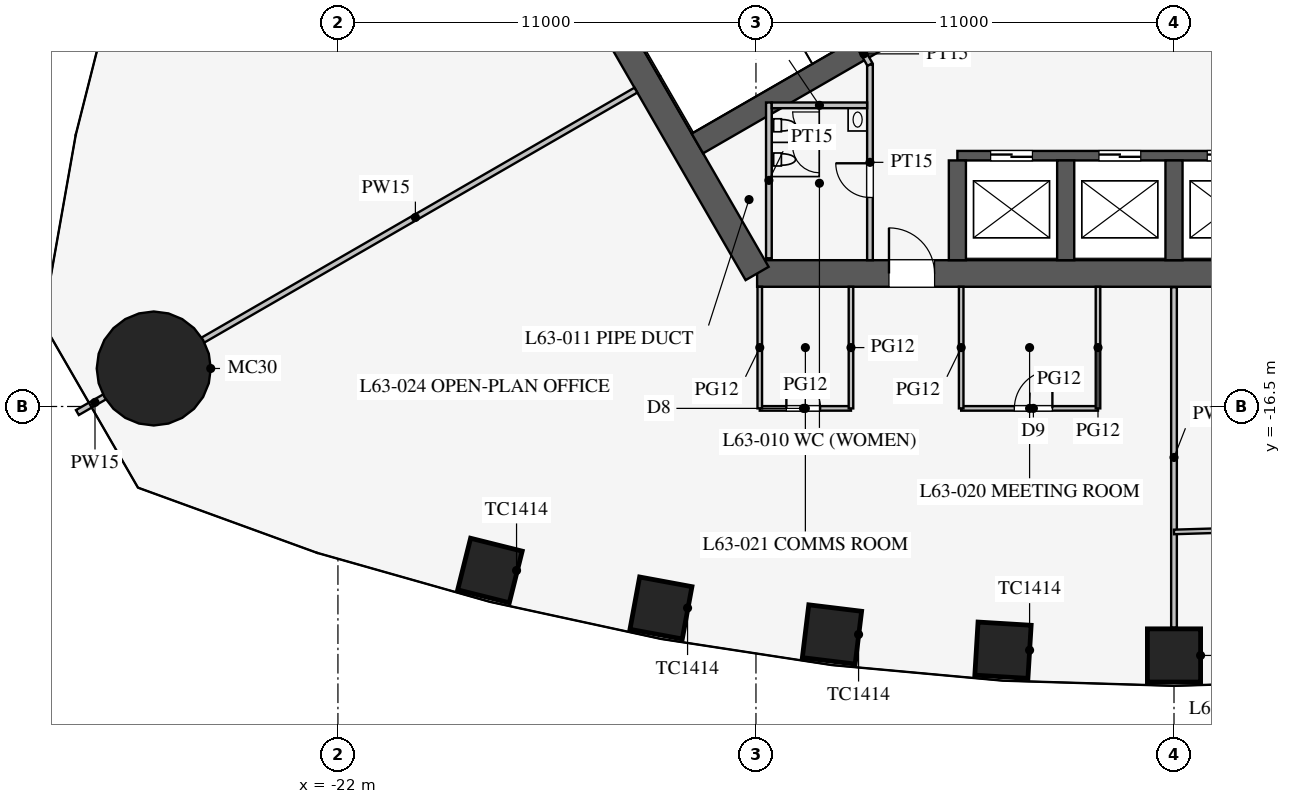
"""IFC4 building model, lengths in metres.
Left out: names, types, materials, properties, quantities, classifications, styles, units other than length and angle.
Written with IfcOpenShell. Run it as: python <this file> out.ifc"""

import sys

from ifc_helpers import new_model, si_unit, direction, frame, frame_2d, origin, origin_2d, place, context, subcontext, project, spatial, rectangle, circle, extrude, element, fill, save


model = new_model("IFC4")
c1 = context("Model", 3, precision=1e-05, world=origin(), true_north=direction((0.0, 1.0)))
c2 = subcontext(c1, "Body", "Model", "MODEL_VIEW")
j1 = project(units=[si_unit("LENGTHUNIT", "METRE"), si_unit("PLANEANGLEUNIT", "RADIAN")], contexts=[c1])
p1 = place(None, origin())
s1 = spatial("IfcSite", under=j1, at=p1, CompositionType="ELEMENT")
p2 = place(p1, origin())
s2 = spatial("IfcBuilding", under=s1, at=p2, CompositionType="ELEMENT")
p3 = place(p2, frame((0.0, 0.0, 276.3)))
s3 = spatial("IfcBuildingStorey", under=s2, at=p3, CompositionType="ELEMENT", Elevation=276.3)
for number, where, z_axis, x_axis in (
    (1, (-18.0, -20.816, 0.0), (0.0, 0.0, 1.0), (0.97, -0.242, 0.0)),
    (2, (-13.5, -21.803, 0.0), (0.0, 0.0, 1.0), (0.983, -0.182, 0.0)),
    (3, (-9.0, -22.499, 0.0), (0.0, 0.0, 1.0), (0.993, -0.121, 0.0)),
    (4, (-4.5, -22.914, 0.0), (0.0, 0.0, 1.0), (0.998, -0.061, 0.0)),
    (5, (0.0, -23.052, 0.0), (0.0, 0.0, 1.0), (1.0, 0.0, 0.0)),
):
    element("IfcColumn", number, at=place(p3, frame(where, z_axis=z_axis, x_axis=x_axis)), inside=s3, PredefinedType="COLUMN", context=c2, shape_type="SweptSolid", body=[
        extrude(rectangle(XDim=1.4, YDim=1.4, at=origin_2d()), origin(), (0.0, 0.0, 1.0), 4.2),
    ])
p4 = place(p3, frame((-26.847, -15.5, 0.0), z_axis=(0.0, 0.0, 1.0), x_axis=(1.0, 0.0, 0.0)))
e6 = element("IfcColumn", 6, at=p4, inside=s3, PredefinedType="COLUMN", context=c2, shape_type="SweptSolid", body=[
    extrude(circle(Radius=1.5, at=origin_2d()), origin(), (0.0, 0.0, 1.0), 4.2),
])
p5 = place(p3, frame((-10.97, -13.0, 0.0), z_axis=(0.0, 0.0, 1.0), x_axis=(1.0, 0.0, 0.0)))
e7 = element("IfcWall", 7, at=p5, inside=s3, PredefinedType="SHEAR", context=c2, shape_type="SweptSolid", body=[
    extrude(rectangle(XDim=21.939, YDim=0.7, at=frame_2d((10.97, 0.0))), origin(), (0.0, 0.0, 1.0), 4.2),
])
p6 = place(p5, frame((17.27, 0.0, 0.0)))
e8 = element("IfcOpeningElement", 8, at=p6, cuts=e7, PredefinedType="OPENING", context=c2, shape_type="SweptSolid", body=[
    extrude(rectangle(XDim=1.2, YDim=2.1, at=frame_2d((0.6, 1.05))), frame((0.0, 0.36, 0.0), z_axis=(0.0, -1.0, 0.0), x_axis=(1.0, 0.0, 0.0)), (0.0, 0.0, 1.0), 0.72),
])
p7 = place(p5, frame((3.47, 0.0, 0.0)))
e9 = element("IfcOpeningElement", 9, at=p7, cuts=e7, PredefinedType="OPENING", context=c2, shape_type="SweptSolid", body=[
    extrude(rectangle(XDim=1.2, YDim=2.1, at=frame_2d((0.6, 1.05))), frame((0.0, 0.36, 0.0), z_axis=(0.0, -1.0, 0.0), x_axis=(1.0, 0.0, 0.0)), (0.0, 0.0, 1.0), 0.72),
])
p8 = place(p3, frame((-16.743, -3.0, 0.0), z_axis=(0.0, 0.0, 1.0), x_axis=(0.499995765644, -0.866027848477, 0.0)))
e10 = element("IfcWall", 10, at=p8, inside=s3, PredefinedType="SHEAR", context=c2, shape_type="SweptSolid", body=[
    extrude(rectangle(XDim=11.547, YDim=0.7, at=frame_2d((5.773, 0.0))), origin(), (0.0, 0.0, 1.0), 4.2),
])
p9 = place(p3, frame((-5.7, -9.9, 0.0), z_axis=(0.0, 0.0, 1.0), x_axis=(1.0, 0.0, 0.0)))
e11 = element("IfcWall", 11, at=p9, inside=s3, PredefinedType="SHEAR", context=c2, shape_type="SweptSolid", body=[
    extrude(rectangle(XDim=11.4, YDim=0.25, at=frame_2d((5.7, 0.0))), origin(), (0.0, 0.0, 1.0), 4.2),
])
p10 = place(p9, frame((0.875, 0.0, 0.0)))
e12 = element("IfcOpeningElement", 12, at=p10, cuts=e11, PredefinedType="OPENING", context=c2, shape_type="SweptSolid", body=[
    extrude(rectangle(XDim=1.1, YDim=2.2, at=frame_2d((0.55, 1.1))), frame((0.0, 0.135, 0.0), z_axis=(0.0, -1.0, 0.0), x_axis=(1.0, 0.0, 0.0)), (0.0, 0.0, 1.0), 0.27),
])
p11 = place(p9, frame((3.725, 0.0, 0.0)))
e13 = element("IfcOpeningElement", 13, at=p11, cuts=e11, PredefinedType="OPENING", context=c2, shape_type="SweptSolid", body=[
    extrude(rectangle(XDim=1.1, YDim=2.2, at=frame_2d((0.55, 1.1))), frame((0.0, 0.135, 0.0), z_axis=(0.0, -1.0, 0.0), x_axis=(1.0, 0.0, 0.0)), (0.0, 0.0, 1.0), 0.27),
])
p12 = place(p9, frame((6.575, 0.0, 0.0)))
e14 = element("IfcOpeningElement", 14, at=p12, cuts=e11, PredefinedType="OPENING", context=c2, shape_type="SweptSolid", body=[
    extrude(rectangle(XDim=1.1, YDim=2.2, at=frame_2d((0.55, 1.1))), frame((0.0, 0.135, 0.0), z_axis=(0.0, -1.0, 0.0), x_axis=(1.0, 0.0, 0.0)), (0.0, 0.0, 1.0), 0.27),
])
p13 = place(p9, frame((9.425, 0.0, 0.0)))
e15 = element("IfcOpeningElement", 15, at=p13, cuts=e11, PredefinedType="OPENING", context=c2, shape_type="SweptSolid", body=[
    extrude(rectangle(XDim=1.1, YDim=2.2, at=frame_2d((0.55, 1.1))), frame((0.0, 0.135, 0.0), z_axis=(0.0, -1.0, 0.0), x_axis=(1.0, 0.0, 0.0)), (0.0, 0.0, 1.0), 0.27),
])
for number, where, z_axis, x_axis in (
    (16, (-5.7, -10.025, 0.0), (0.0, 0.0, 1.0), (0.0, -1.0, 0.0)),
    (17, (-2.85, -10.025, 0.0), (0.0, 0.0, 1.0), (0.0, -1.0, 0.0)),
    (18, (0.0, -10.025, 0.0), (0.0, 0.0, 1.0), (0.0, -1.0, 0.0)),
):
    element("IfcWall", number, at=place(p3, frame(where, z_axis=z_axis, x_axis=x_axis)), inside=s3, PredefinedType="SHEAR", context=c2, shape_type="SweptSolid", body=[
        extrude(rectangle(XDim=2.625, YDim=0.45, at=frame_2d((1.312, 0.0))), origin(), (0.0, 0.0, 1.0), 4.2),
    ])
p14 = place(p3, frame((-4.638, -5.016, 0.0), z_axis=(0.0, 0.0, 1.0), x_axis=(-0.866021621257, -0.500006551472, 0.0)))
e19 = element("IfcWall", 19, at=p14, inside=s3, PredefinedType="SHEAR", context=c2, shape_type="SweptSolid", body=[
    extrude(rectangle(XDim=9.125, YDim=0.6, at=frame_2d((4.562, 0.0))), origin(), (0.0, 0.0, 1.0), 4.2),
])
p15 = place(p3, frame((-8.0, -7.5, 0.0), z_axis=(0.0, 0.0, 1.0), x_axis=(0.0, -1.0, 0.0)))
e20 = element("IfcWall", 20, at=p15, inside=s3, PredefinedType="PARTITIONING", context=c2, shape_type="SweptSolid", body=[
    extrude(rectangle(XDim=5.15, YDim=0.15, at=frame_2d((2.575, 0.0))), origin(), (0.0, 0.0, 1.0), 4.0),
])
p16 = place(p15, frame((2.6, 0.0, 0.0)))
e21 = element("IfcOpeningElement", 21, at=p16, cuts=e20, PredefinedType="OPENING", context=c2, shape_type="SweptSolid", body=[
    extrude(rectangle(XDim=0.9, YDim=2.1, at=frame_2d((0.45, 1.05))), frame((0.0, 0.085, 0.0), z_axis=(0.0, -1.0, 0.0), x_axis=(1.0, 0.0, 0.0)), (0.0, 0.0, 1.0), 0.17),
])
p17 = place(p3, frame((-8.0, -7.5, 0.0), z_axis=(0.0, 0.0, 1.0), x_axis=(-0.499842556608, 0.866116284689, 0.0)))
e22 = element("IfcWall", 22, at=p17, inside=s3, PredefinedType="PARTITIONING", context=c2, shape_type="SweptSolid", body=[
    extrude(rectangle(XDim=0.645, YDim=0.15, at=frame_2d((0.323, 0.0))), origin(), (0.0, 0.0, 1.0), 4.0),
])
p18 = place(p3, frame((-10.66, -8.5, 0.0), z_axis=(0.0, 0.0, 1.0), x_axis=(0.0, -1.0, 0.0)))
e23 = element("IfcWall", 23, at=p18, inside=s3, PredefinedType="PARTITIONING", context=c2, shape_type="SweptSolid", body=[
    extrude(rectangle(XDim=4.1, YDim=0.15, at=frame_2d((2.05, 0.0))), origin(), (0.0, 0.0, 1.0), 4.0),
])
p19 = place(p3, frame((-8.075, -8.575, 0.0), z_axis=(0.0, 0.0, 1.0), x_axis=(-1.0, 0.0, 0.0)))
e24 = element("IfcWall", 24, at=p19, inside=s3, PredefinedType="PARTITIONING", context=c2, shape_type="SweptSolid", body=[
    extrude(rectangle(XDim=2.51, YDim=0.15, at=frame_2d((1.255, 0.0))), origin(), (0.0, 0.0, 1.0), 4.0),
])
p20 = place(p3, frame((-14.159, -8.175, 0.0), z_axis=(0.0, 0.0, 1.0), x_axis=(-0.866026905467, -0.499997399001, 0.0)))
e25 = element("IfcWall", 25, at=p20, inside=s3, PredefinedType="PARTITIONING", context=c2, shape_type="SweptSolid", body=[
    extrude(rectangle(XDim=13.4, YDim=0.15, at=frame_2d((6.7, 0.0))), origin(), (0.0, 0.0, 1.0), 2.5),
])
p21 = place(p3, frame((-27.929, -16.125, 0.0), z_axis=(0.0, 0.0, 1.0), x_axis=(-0.866086810508, -0.499893625349, 0.0)))
e26 = element("IfcWall", 26, at=p21, inside=s3, PredefinedType="PARTITIONING", context=c2, shape_type="SweptSolid", body=[
    extrude(rectangle(XDim=1.07, YDim=0.15, at=frame_2d((0.535, 0.0))), origin(), (0.0, 0.0, 1.0), 2.5),
])
p22 = place(p3, frame((0.0, -13.36, 0.0), z_axis=(0.0, 0.0, 1.0), x_axis=(0.0, -1.0, 0.0)))
e27 = element("IfcWall", 27, at=p22, inside=s3, PredefinedType="PARTITIONING", context=c2, shape_type="SweptSolid", body=[
    extrude(rectangle(XDim=8.961, YDim=0.15, at=frame_2d((4.481, 0.0))), origin(), (0.0, 0.0, 1.0), 2.6),
])
p23 = place(p3, frame((-10.9, -16.55, 0.0), z_axis=(0.0, 0.0, 1.0), x_axis=(1.0, 0.0, 0.0)))
e28 = element("IfcWall", 28, at=p23, inside=s3, PredefinedType="PARTITIONING", context=c2, shape_type="SweptSolid", body=[
    extrude(rectangle(XDim=2.4, YDim=0.12, at=frame_2d((1.2, 0.0))), origin(), (0.0, 0.0, 1.0), 2.9),
])
p24 = place(p23, frame((0.7, 0.0, 0.15)))
e29 = element("IfcOpeningElement", 29, at=p24, cuts=e28, PredefinedType="OPENING", context=c2, shape_type="SweptSolid", body=[
    extrude(rectangle(XDim=0.9, YDim=2.1, at=frame_2d((0.45, 1.05))), frame((0.0, 0.07, 0.0), z_axis=(0.0, -1.0, 0.0), x_axis=(1.0, 0.0, 0.0)), (0.0, 0.0, 1.0), 0.14),
])
p25 = place(p3, frame((-5.6, -16.55, 0.0), z_axis=(0.0, 0.0, 1.0), x_axis=(1.0, 0.0, 0.0)))
e30 = element("IfcWall", 30, at=p25, inside=s3, PredefinedType="PARTITIONING", context=c2, shape_type="SweptSolid", body=[
    extrude(rectangle(XDim=3.6, YDim=0.12, at=frame_2d((1.8, 0.0))), origin(), (0.0, 0.0, 1.0), 2.9),
])
p26 = place(p25, frame((1.4, 0.0, 0.15)))
e31 = element("IfcOpeningElement", 31, at=p26, cuts=e30, PredefinedType="OPENING", context=c2, shape_type="SweptSolid", body=[
    extrude(rectangle(XDim=1.0, YDim=2.1, at=frame_2d((0.5, 1.05))), frame((0.0, 0.07, 0.0), z_axis=(0.0, -1.0, 0.0), x_axis=(1.0, 0.0, 0.0)), (0.0, 0.0, 1.0), 0.14),
])
for number, where, z_axis, x_axis in (
    (32, (-10.9, -13.35, 0.0), (0.0, 0.0, 1.0), (0.0, -1.0, 0.0)),
    (33, (-2.0, -13.35, 0.0), (0.0, 0.0, 1.0), (0.0, -1.0, 0.0)),
    (34, (-5.6, -13.35, 0.0), (0.0, 0.0, 1.0), (0.0, -1.0, 0.0)),
    (35, (-8.5, -13.35, 0.0), (0.0, 0.0, 1.0), (0.0, -1.0, 0.0)),
):
    element("IfcWall", number, at=place(p3, frame(where, z_axis=z_axis, x_axis=x_axis)), inside=s3, PredefinedType="PARTITIONING", context=c2, shape_type="SweptSolid", body=[
        extrude(rectangle(XDim=3.2, YDim=0.12, at=frame_2d((1.6, 0.0))), origin(), (0.0, 0.0, 1.0), 2.9),
    ])
p27 = place(p3, frame((0.0, -19.802, 0.0), z_axis=(0.0, 0.0, 1.0), x_axis=(0.999542074227, 0.030259574513, 0.0)))
e36 = element("IfcWall", 36, at=p27, inside=s3, PredefinedType="PARTITIONING", context=c2, shape_type="SweptSolid", body=[
    extrude(rectangle(XDim=4.502, YDim=0.12, at=frame_2d((2.251, 0.0))), origin(), (0.0, 0.0, 1.0), 2.9),
])
p28 = place(p3, frame((25.854, -14.361, 0.0), z_axis=(0.0, 0.0, 1.0), x_axis=(-0.499999496503, 0.866025694478, 0.0)))
e37 = element("IfcWall", 37, at=p28, inside=s3, PredefinedType="PARTITIONING", context=c2, shape_type="SweptSolid", body=[
    extrude(rectangle(XDim=50.728, YDim=0.12, at=frame_2d((25.364, 0.0))), origin(), (0.0, 0.0, 1.0), 2.9),
])
p29 = place(p28, frame((9.75, 0.0, 0.15)))
e38 = element("IfcOpeningElement", 38, at=p29, cuts=e37, PredefinedType="OPENING", context=c2, shape_type="SweptSolid", body=[
    extrude(rectangle(XDim=1.8, YDim=2.1, at=frame_2d((0.9, 1.05))), frame((0.0, 0.07, 0.0), z_axis=(0.0, -1.0, 0.0), x_axis=(1.0, 0.0, 0.0)), (0.0, 0.0, 1.0), 0.14),
])
p30 = place(p28, frame((39.2, 0.0, 0.15)))
e39 = element("IfcOpeningElement", 39, at=p30, cuts=e37, PredefinedType="OPENING", context=c2, shape_type="SweptSolid", body=[
    extrude(rectangle(XDim=1.8, YDim=2.1, at=frame_2d((0.9, 1.05))), frame((0.0, 0.07, 0.0), z_axis=(0.0, -1.0, 0.0), x_axis=(1.0, 0.0, 0.0)), (0.0, 0.0, 1.0), 0.14),
])
p31 = place(p16, frame((0.9, 0.0, 0.0), z_axis=(0.0, 0.0, 1.0), x_axis=(-1.0, 0.0, 0.0)))
e40 = element("IfcDoor", 40, at=p31, inside=s3, OperationType="SINGLE_SWING_RIGHT", PredefinedType="DOOR", context=c2, shape_type="SweptSolid", body=[
    extrude(rectangle(XDim=0.9, YDim=2.1, at=frame_2d((0.45, 1.05))), frame((0.0, 0.025, 0.0), z_axis=(0.0, -1.0, 0.0), x_axis=(1.0, 0.0, 0.0)), (0.0, 0.0, 1.0), 0.05),
])
fill(e21, e40)
p32 = place(p7, origin())
e41 = element("IfcDoor", 41, at=p32, inside=s3, OperationType="SINGLE_SWING_LEFT", PredefinedType="DOOR", context=c2, shape_type="SweptSolid", body=[
    extrude(rectangle(XDim=1.2, YDim=2.1, at=frame_2d((0.6, 1.05))), frame((0.0, 0.025, 0.0), z_axis=(0.0, -1.0, 0.0), x_axis=(1.0, 0.0, 0.0)), (0.0, 0.0, 1.0), 0.05),
])
fill(e9, e41)
p33 = place(p26, origin())
e42 = element("IfcDoor", 42, at=p33, inside=s3, OperationType="SINGLE_SWING_RIGHT", PredefinedType="DOOR", context=c2, shape_type="SweptSolid", body=[
    extrude(rectangle(XDim=1.0, YDim=2.1, at=frame_2d((0.5, 1.05))), frame((0.0, 0.025, 0.0), z_axis=(0.0, -1.0, 0.0), x_axis=(1.0, 0.0, 0.0)), (0.0, 0.0, 1.0), 0.05),
])
fill(e31, e42)
p34 = place(p24, origin())
e43 = element("IfcDoor", 43, at=p34, inside=s3, OperationType="SINGLE_SWING_LEFT", PredefinedType="DOOR", context=c2, shape_type="SweptSolid", body=[
    extrude(rectangle(XDim=0.9, YDim=2.1, at=frame_2d((0.45, 1.05))), frame((0.0, 0.025, 0.0), z_axis=(0.0, -1.0, 0.0), x_axis=(1.0, 0.0, 0.0)), (0.0, 0.0, 1.0), 0.05),
])
fill(e29, e43)
p35 = place(p10, origin())
e44 = element("IfcDoor", 44, at=p35, inside=s3, OperationType="DOUBLE_DOOR_SLIDING", PredefinedType="DOOR", context=c2, shape_type="SweptSolid", body=[
    extrude(rectangle(XDim=1.1, YDim=2.2, at=frame_2d((0.55, 1.1))), frame((0.0, 0.025, 0.0), z_axis=(0.0, -1.0, 0.0), x_axis=(1.0, 0.0, 0.0)), (0.0, 0.0, 1.0), 0.05),
])
fill(e12, e44)
p36 = place(p11, origin())
e45 = element("IfcDoor", 45, at=p36, inside=s3, OperationType="DOUBLE_DOOR_SLIDING", PredefinedType="DOOR", context=c2, shape_type="SweptSolid", body=[
    extrude(rectangle(XDim=1.1, YDim=2.2, at=frame_2d((0.55, 1.1))), frame((0.0, 0.025, 0.0), z_axis=(0.0, -1.0, 0.0), x_axis=(1.0, 0.0, 0.0)), (0.0, 0.0, 1.0), 0.05),
])
fill(e13, e45)
p37 = place(p12, origin())
e46 = element("IfcDoor", 46, at=p37, inside=s3, OperationType="DOUBLE_DOOR_SLIDING", PredefinedType="DOOR", context=c2, shape_type="SweptSolid", body=[
    extrude(rectangle(XDim=1.1, YDim=2.2, at=frame_2d((0.55, 1.1))), frame((0.0, 0.025, 0.0), z_axis=(0.0, -1.0, 0.0), x_axis=(1.0, 0.0, 0.0)), (0.0, 0.0, 1.0), 0.05),
])
fill(e14, e46)
save(model, sys.argv[1])
